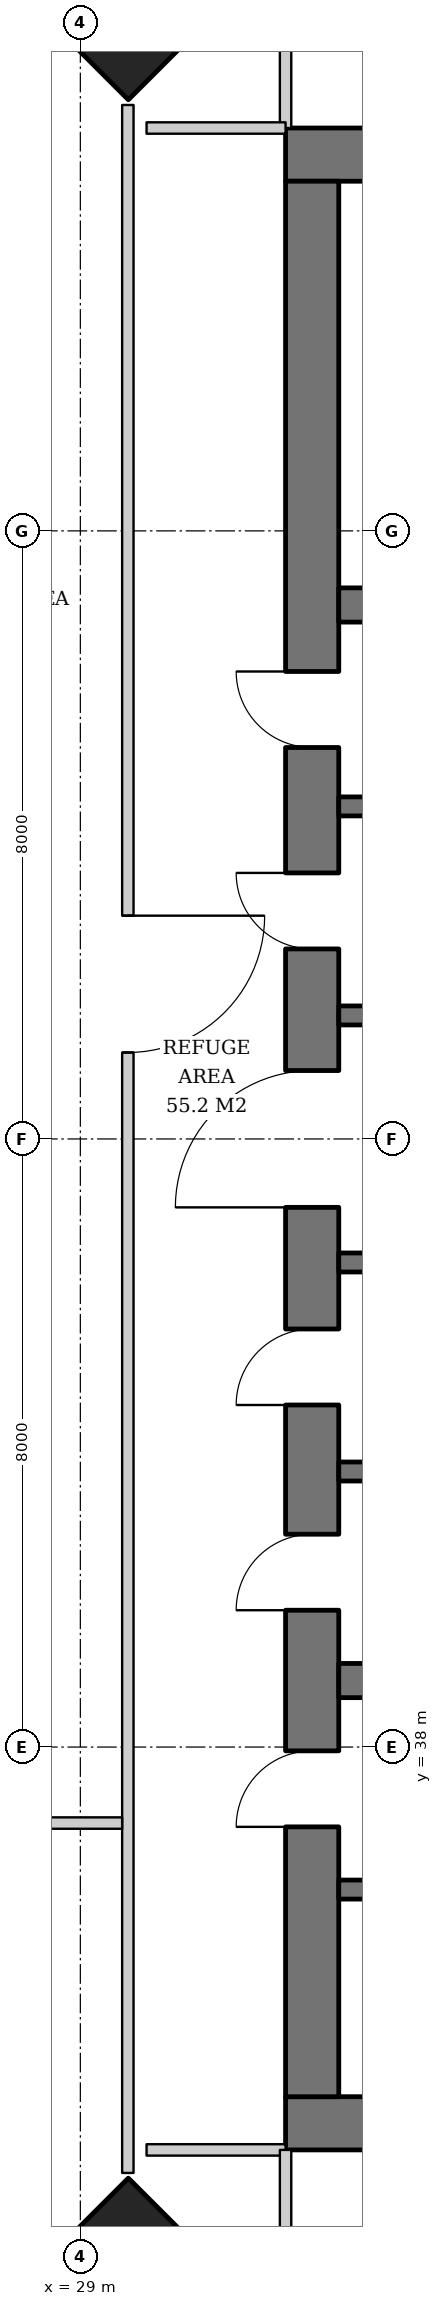
"""IFC4 building model, lengths in metres.
Left out: names, types, materials, properties, quantities, classifications, styles, units other than length and angle.
Written with IfcOpenShell. Run it as: python <this file> out.ifc"""

import sys

from ifc_helpers import new_model, si_unit, direction, frame, frame_2d, origin, origin_2d, place, context, subcontext, project, spatial, rectangle, extrude, element, fill, save


model = new_model("IFC4")
c1 = context("Model", 3, precision=1e-05, world=origin(), true_north=direction((0.0, 1.0)))
c2 = subcontext(c1, "Body", "Model", "MODEL_VIEW")
j1 = project(units=[si_unit("LENGTHUNIT", "METRE"), si_unit("PLANEANGLEUNIT", "RADIAN")], contexts=[c1])
p1 = place(None, origin())
s1 = spatial("IfcSite", under=j1, at=p1, CompositionType="ELEMENT")
p2 = place(p1, origin())
s2 = spatial("IfcBuilding", under=s1, at=p2, CompositionType="ELEMENT")
p3 = place(p2, frame((0.0, 0.0, 161.6)))
s3 = spatial("IfcBuildingStorey", under=s2, at=p3, CompositionType="ELEMENT", Elevation=161.6)
for number, where, z_axis, x_axis in (
    (1, (29.593, 61.407, 0.0), (0.032, -0.032, 0.999), (0.707, 0.707, 0.0)),
    (2, (29.593, 30.593, 0.0), (0.032, 0.032, 0.999), (-0.707, 0.707, 0.0)),
):
    element("IfcColumn", number, at=place(p3, frame(where, z_axis=z_axis, x_axis=x_axis)), inside=s3, PredefinedType="COLUMN", context=c2, shape_type="SweptSolid", body=[
        extrude(rectangle(XDim=2.4, YDim=2.4, at=origin_2d()), origin(), (0.0, 0.0, 1.0), 3.804),
    ])
p4 = place(p3, frame((31.7, 33.05, 0.0), z_axis=(0.0, 0.0, 1.0), x_axis=(1.0, 0.0, 0.0)))
e3 = element("IfcWall", 3, at=p4, inside=s3, PredefinedType="SHEAR", context=c2, shape_type="SweptSolid", body=[
    extrude(rectangle(XDim=26.6, YDim=0.7, at=frame_2d((13.3, 0.0))), origin(), (0.0, 0.0, 1.0), 3.8),
])
p5 = place(p4, frame((7.3, 0.0, 0.0)))
e4 = element("IfcOpeningElement", 4, at=p5, cuts=e3, PredefinedType="OPENING", context=c2, shape_type="SweptSolid", body=[
    extrude(rectangle(XDim=1.0, YDim=2.1, at=frame_2d((0.5, 1.05))), frame((0.0, 0.36, 0.0), z_axis=(0.0, -1.0, 0.0), x_axis=(1.0, 0.0, 0.0)), (0.0, 0.0, 1.0), 0.72),
])
p6 = place(p4, frame((18.75, 0.0, 0.0)))
e5 = element("IfcOpeningElement", 5, at=p6, cuts=e3, PredefinedType="OPENING", context=c2, shape_type="SweptSolid", body=[
    extrude(rectangle(XDim=1.0, YDim=2.1, at=frame_2d((0.5, 1.05))), frame((0.0, 0.36, 0.0), z_axis=(0.0, -1.0, 0.0), x_axis=(1.0, 0.0, 0.0)), (0.0, 0.0, 1.0), 0.72),
])
p7 = place(p4, frame((3.2, 0.0, 0.0)))
e6 = element("IfcOpeningElement", 6, at=p7, cuts=e3, PredefinedType="OPENING", context=c2, shape_type="SweptSolid", body=[
    extrude(rectangle(XDim=1.0, YDim=2.1, at=frame_2d((0.5, 1.05))), frame((0.0, 0.36, 0.0), z_axis=(0.0, -1.0, 0.0), x_axis=(1.0, 0.0, 0.0)), (0.0, 0.0, 1.0), 0.72),
])
p8 = place(p3, frame((31.7, 58.95, 0.0), z_axis=(0.0, 0.0, 1.0), x_axis=(1.0, 0.0, 0.0)))
e7 = element("IfcWall", 7, at=p8, inside=s3, PredefinedType="SHEAR", context=c2, shape_type="SweptSolid", body=[
    extrude(rectangle(XDim=26.6, YDim=0.7, at=frame_2d((13.3, 0.0))), origin(), (0.0, 0.0, 1.0), 3.8),
])
p9 = place(p8, frame((17.94, 0.0, 0.0)))
e8 = element("IfcOpeningElement", 8, at=p9, cuts=e7, PredefinedType="OPENING", context=c2, shape_type="SweptSolid", body=[
    extrude(rectangle(XDim=1.0, YDim=2.1, at=frame_2d((0.5, 1.05))), frame((0.0, 0.36, 0.0), z_axis=(0.0, -1.0, 0.0), x_axis=(1.0, 0.0, 0.0)), (0.0, 0.0, 1.0), 0.72),
])
p10 = place(p8, frame((5.825, 0.0, 0.0)))
e9 = element("IfcOpeningElement", 9, at=p10, cuts=e7, PredefinedType="OPENING", context=c2, shape_type="SweptSolid", body=[
    extrude(rectangle(XDim=1.0, YDim=2.1, at=frame_2d((0.5, 1.05))), frame((0.0, 0.36, 0.0), z_axis=(0.0, -1.0, 0.0), x_axis=(1.0, 0.0, 0.0)), (0.0, 0.0, 1.0), 0.72),
])
p11 = place(p8, frame((1.837, 0.0, 0.0)))
e10 = element("IfcOpeningElement", 10, at=p11, cuts=e7, PredefinedType="OPENING", context=c2, shape_type="SweptSolid", body=[
    extrude(rectangle(XDim=1.0, YDim=2.1, at=frame_2d((0.5, 1.05))), frame((0.0, 0.36, 0.0), z_axis=(0.0, -1.0, 0.0), x_axis=(1.0, 0.0, 0.0)), (0.0, 0.0, 1.0), 0.72),
])
p12 = place(p8, frame((3.781, 0.0, 0.0)))
e11 = element("IfcOpeningElement", 11, at=p12, cuts=e7, PredefinedType="OPENING", context=c2, shape_type="SweptSolid", body=[
    extrude(rectangle(XDim=1.0, YDim=2.1, at=frame_2d((0.5, 1.05))), frame((0.0, 0.36, 0.0), z_axis=(0.0, -1.0, 0.0), x_axis=(1.0, 0.0, 0.0)), (0.0, 0.0, 1.0), 0.72),
])
p13 = place(p3, frame((32.05, 33.4, 0.0), z_axis=(0.0, 0.0, 1.0), x_axis=(0.0, 1.0, 0.0)))
e12 = element("IfcWall", 12, at=p13, inside=s3, PredefinedType="SHEAR", context=c2, shape_type="SweptSolid", body=[
    extrude(rectangle(XDim=25.2, YDim=0.7, at=frame_2d((12.6, 0.0))), origin(), (0.0, 0.0, 1.0), 3.8),
])
p14 = place(p13, frame((11.7, 0.0, 0.0)))
e13 = element("IfcOpeningElement", 13, at=p14, cuts=e12, PredefinedType="OPENING", context=c2, shape_type="SweptSolid", body=[
    extrude(rectangle(XDim=1.8, YDim=2.4, at=frame_2d((0.9, 1.2))), frame((0.0, 0.36, 0.0), z_axis=(0.0, -1.0, 0.0), x_axis=(1.0, 0.0, 0.0)), (0.0, 0.0, 1.0), 0.72),
])
p15 = place(p13, frame((3.55, 0.0, 0.0)))
e14 = element("IfcOpeningElement", 14, at=p15, cuts=e12, PredefinedType="OPENING", context=c2, shape_type="SweptSolid", body=[
    extrude(rectangle(XDim=1.0, YDim=2.1, at=frame_2d((0.5, 1.05))), frame((0.0, 0.36, 0.0), z_axis=(0.0, -1.0, 0.0), x_axis=(1.0, 0.0, 0.0)), (0.0, 0.0, 1.0), 0.72),
])
p16 = place(p13, frame((6.4, 0.0, 0.0)))
e15 = element("IfcOpeningElement", 15, at=p16, cuts=e12, PredefinedType="OPENING", context=c2, shape_type="SweptSolid", body=[
    extrude(rectangle(XDim=1.0, YDim=2.1, at=frame_2d((0.5, 1.05))), frame((0.0, 0.36, 0.0), z_axis=(0.0, -1.0, 0.0), x_axis=(1.0, 0.0, 0.0)), (0.0, 0.0, 1.0), 0.72),
])
p17 = place(p13, frame((9.1, 0.0, 0.0)))
e16 = element("IfcOpeningElement", 16, at=p17, cuts=e12, PredefinedType="OPENING", context=c2, shape_type="SweptSolid", body=[
    extrude(rectangle(XDim=1.0, YDim=2.1, at=frame_2d((0.5, 1.05))), frame((0.0, 0.36, 0.0), z_axis=(0.0, -1.0, 0.0), x_axis=(1.0, 0.0, 0.0)), (0.0, 0.0, 1.0), 0.72),
])
p18 = place(p13, frame((15.1, 0.0, 0.0)))
e17 = element("IfcOpeningElement", 17, at=p18, cuts=e12, PredefinedType="OPENING", context=c2, shape_type="SweptSolid", body=[
    extrude(rectangle(XDim=1.0, YDim=2.1, at=frame_2d((0.5, 1.05))), frame((0.0, 0.36, 0.0), z_axis=(0.0, -1.0, 0.0), x_axis=(1.0, 0.0, 0.0)), (0.0, 0.0, 1.0), 0.72),
])
p19 = place(p13, frame((17.75, 0.0, 0.0)))
e18 = element("IfcOpeningElement", 18, at=p19, cuts=e12, PredefinedType="OPENING", context=c2, shape_type="SweptSolid", body=[
    extrude(rectangle(XDim=1.0, YDim=2.1, at=frame_2d((0.5, 1.05))), frame((0.0, 0.36, 0.0), z_axis=(0.0, -1.0, 0.0), x_axis=(1.0, 0.0, 0.0)), (0.0, 0.0, 1.0), 0.72),
])
p20 = place(p3, frame((32.4, 36.125, 0.0), z_axis=(0.0, 0.0, 1.0), x_axis=(1.0, 0.0, 0.0)))
e19 = element("IfcWall", 19, at=p20, inside=s3, PredefinedType="SHEAR", context=c2, shape_type="SweptSolid", body=[
    extrude(rectangle(XDim=2.7, YDim=0.25, at=frame_2d((1.35, 0.0))), origin(), (0.0, 0.0, 1.0), 3.8),
])
p21 = place(p3, frame((32.4, 38.875, 0.0), z_axis=(0.0, 0.0, 1.0), x_axis=(1.0, 0.0, 0.0)))
e20 = element("IfcWall", 20, at=p21, inside=s3, PredefinedType="SHEAR", context=c2, shape_type="SweptSolid", body=[
    extrude(rectangle(XDim=2.7, YDim=0.45, at=frame_2d((1.35, 0.0))), origin(), (0.0, 0.0, 1.0), 3.8),
])
for number, where, z_axis, x_axis in (
    (21, (32.4, 41.625, 0.0), (0.0, 0.0, 1.0), (1.0, 0.0, 0.0)),
    (22, (32.4, 44.375, 0.0), (0.0, 0.0, 1.0), (1.0, 0.0, 0.0)),
    (23, (32.4, 47.625, 0.0), (0.0, 0.0, 1.0), (1.0, 0.0, 0.0)),
    (24, (32.4, 50.375, 0.0), (0.0, 0.0, 1.0), (1.0, 0.0, 0.0)),
):
    element("IfcWall", number, at=place(p3, frame(where, z_axis=z_axis, x_axis=x_axis)), inside=s3, PredefinedType="SHEAR", context=c2, shape_type="SweptSolid", body=[
        extrude(rectangle(XDim=2.7, YDim=0.25, at=frame_2d((1.35, 0.0))), origin(), (0.0, 0.0, 1.0), 3.8),
    ])
p22 = place(p3, frame((32.4, 53.025, 0.0), z_axis=(0.0, 0.0, 1.0), x_axis=(1.0, 0.0, 0.0)))
e25 = element("IfcWall", 25, at=p22, inside=s3, PredefinedType="SHEAR", context=c2, shape_type="SweptSolid", body=[
    extrude(rectangle(XDim=2.7, YDim=0.45, at=frame_2d((1.35, 0.0))), origin(), (0.0, 0.0, 1.0), 3.8),
])
for number, where, z_axis, x_axis in (
    (26, (31.7, 59.3, 0.0), (0.0, 0.0, 1.0), (0.0, 1.0, 0.0)),
    (27, (31.7, 32.7, 0.0), (0.0, 0.0, 1.0), (-1.0, 0.0, 0.0)),
    (28, (31.7, 59.3, 0.0), (0.0, 0.0, 1.0), (-1.0, 0.0, 0.0)),
):
    element("IfcWall", number, at=place(p3, frame(where, z_axis=z_axis, x_axis=x_axis)), inside=s3, PredefinedType="PARTITIONING", context=c2, shape_type="SweptSolid", body=[
        extrude(rectangle(XDim=1.829, YDim=0.15, at=frame_2d((0.915, 0.0))), origin(), (0.0, 0.0, 1.0), 3.6),
    ])
p23 = place(p3, frame((29.625, 59.603, 0.0), z_axis=(0.0, 0.0, 1.0), x_axis=(0.0, -1.0, 0.0)))
e29 = element("IfcWall", 29, at=p23, inside=s3, PredefinedType="PARTITIONING", context=c2, shape_type="SweptSolid", body=[
    extrude(rectangle(XDim=27.206, YDim=0.15, at=frame_2d((13.603, 0.0))), origin(), (0.0, 0.0, 1.0), 2.83),
])
p24 = place(p23, frame((10.666, 0.0, 0.0)))
e30 = element("IfcOpeningElement", 30, at=p24, cuts=e29, PredefinedType="OPENING", context=c2, shape_type="SweptSolid", body=[
    extrude(rectangle(XDim=1.8, YDim=2.4, at=frame_2d((0.9, 1.2))), frame((0.0, 0.085, 0.0), z_axis=(0.0, -1.0, 0.0), x_axis=(1.0, 0.0, 0.0)), (0.0, 0.0, 1.0), 0.17),
])
p25 = place(p3, frame((29.55, 37.0, 0.0), z_axis=(0.0, 0.0, 1.0), x_axis=(-1.0, 0.0, 0.0)))
e31 = element("IfcWall", 31, at=p25, inside=s3, PredefinedType="PARTITIONING", context=c2, shape_type="SweptSolid", body=[
    extrude(rectangle(XDim=5.59, YDim=0.15, at=frame_2d((2.795, 0.0))), origin(), (0.0, 0.0, 1.0), 3.6),
])
p26 = place(p3, frame((31.7, 32.7, 0.0), z_axis=(0.0, 0.0, 1.0), x_axis=(0.0, -1.0, 0.0)))
e32 = element("IfcWall", 32, at=p26, inside=s3, PredefinedType="PARTITIONING", context=c2, shape_type="SweptSolid", body=[
    extrude(rectangle(XDim=1.829, YDim=0.15, at=frame_2d((0.915, 0.0))), origin(), (0.0, 0.0, 1.0), 3.6),
])
p27 = place(p14, origin())
e33 = element("IfcDoor", 33, at=p27, inside=s3, OperationType="DOUBLE_DOOR_SINGLE_SWING", PredefinedType="DOOR", context=c2, shape_type="SweptSolid", body=[
    extrude(rectangle(XDim=1.8, YDim=2.4, at=frame_2d((0.9, 1.2))), frame((0.0, 0.025, 0.0), z_axis=(0.0, -1.0, 0.0), x_axis=(1.0, 0.0, 0.0)), (0.0, 0.0, 1.0), 0.05),
])
fill(e13, e33)
p28 = place(p15, origin())
e34 = element("IfcDoor", 34, at=p28, inside=s3, OperationType="SINGLE_SWING_LEFT", PredefinedType="DOOR", context=c2, shape_type="SweptSolid", body=[
    extrude(rectangle(XDim=1.0, YDim=2.1, at=frame_2d((0.5, 1.05))), frame((0.0, -0.29, 0.0), z_axis=(0.0, -1.0, 0.0), x_axis=(1.0, 0.0, 0.0)), (0.0, 0.0, 1.0), 0.05),
])
fill(e14, e34)
p29 = place(p16, origin())
e35 = element("IfcDoor", 35, at=p29, inside=s3, OperationType="SINGLE_SWING_LEFT", PredefinedType="DOOR", context=c2, shape_type="SweptSolid", body=[
    extrude(rectangle(XDim=1.0, YDim=2.1, at=frame_2d((0.5, 1.05))), frame((0.0, -0.29, 0.0), z_axis=(0.0, -1.0, 0.0), x_axis=(1.0, 0.0, 0.0)), (0.0, 0.0, 1.0), 0.05),
])
fill(e15, e35)
p30 = place(p17, origin())
e36 = element("IfcDoor", 36, at=p30, inside=s3, OperationType="SINGLE_SWING_LEFT", PredefinedType="DOOR", context=c2, shape_type="SweptSolid", body=[
    extrude(rectangle(XDim=1.0, YDim=2.1, at=frame_2d((0.5, 1.05))), frame((0.0, -0.29, 0.0), z_axis=(0.0, -1.0, 0.0), x_axis=(1.0, 0.0, 0.0)), (0.0, 0.0, 1.0), 0.05),
])
fill(e16, e36)
p31 = place(p18, origin())
e37 = element("IfcDoor", 37, at=p31, inside=s3, OperationType="SINGLE_SWING_RIGHT", PredefinedType="DOOR", context=c2, shape_type="SweptSolid", body=[
    extrude(rectangle(XDim=1.0, YDim=2.1, at=frame_2d((0.5, 1.05))), frame((0.0, -0.29, 0.0), z_axis=(0.0, -1.0, 0.0), x_axis=(1.0, 0.0, 0.0)), (0.0, 0.0, 1.0), 0.05),
])
fill(e17, e37)
p32 = place(p19, origin())
e38 = element("IfcDoor", 38, at=p32, inside=s3, OperationType="SINGLE_SWING_RIGHT", PredefinedType="DOOR", context=c2, shape_type="SweptSolid", body=[
    extrude(rectangle(XDim=1.0, YDim=2.1, at=frame_2d((0.5, 1.05))), frame((0.0, -0.29, 0.0), z_axis=(0.0, -1.0, 0.0), x_axis=(1.0, 0.0, 0.0)), (0.0, 0.0, 1.0), 0.05),
])
fill(e18, e38)
p33 = place(p24, origin())
e39 = element("IfcDoor", 39, at=p33, inside=s3, OperationType="DOUBLE_DOOR_SINGLE_SWING", PredefinedType="DOOR", context=c2, shape_type="SweptSolid", body=[
    extrude(rectangle(XDim=1.8, YDim=2.4, at=frame_2d((0.9, 1.2))), frame((0.0, 0.025, 0.0), z_axis=(0.0, -1.0, 0.0), x_axis=(1.0, 0.0, 0.0)), (0.0, 0.0, 1.0), 0.05),
])
fill(e30, e39)
save(model, sys.argv[1])
